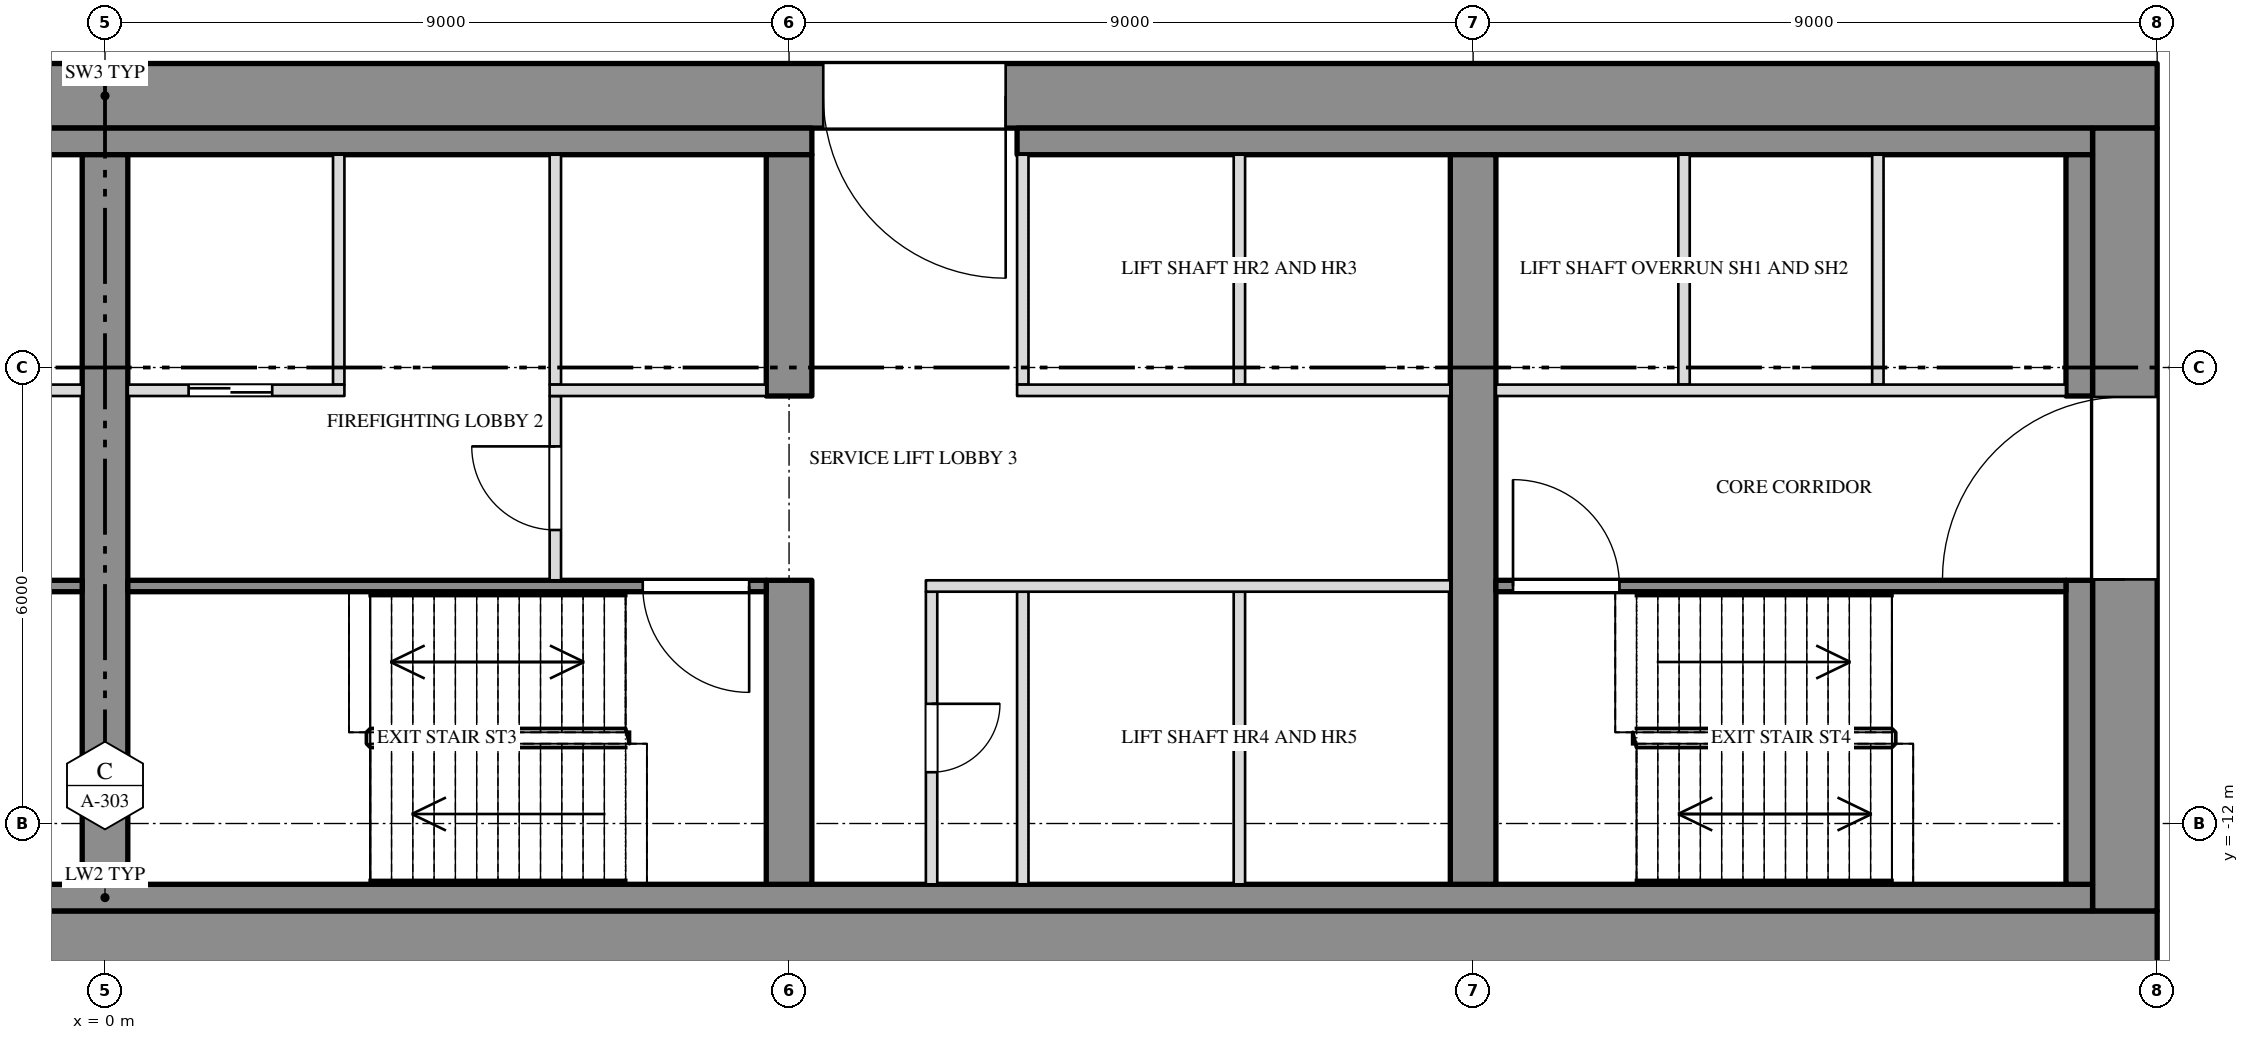
"""IFC4 building model, lengths in metres.
Left out: names, types, materials, properties, quantities, classifications, styles, units other than length and angle.
Written with IfcOpenShell. Run it as: python <this file> out.ifc"""

import sys

from ifc_helpers import new_model, si_unit, direction, frame, frame_2d, origin, place, context, subcontext, project, spatial, rectangle, extrude, element, fill, save


model = new_model("IFC4")
c1 = context("Model", 3, precision=1e-05, world=origin(), true_north=direction((0.0, 1.0)))
c2 = subcontext(c1, "Body", "Model", "MODEL_VIEW")
j1 = project(units=[si_unit("LENGTHUNIT", "METRE"), si_unit("PLANEANGLEUNIT", "RADIAN")], contexts=[c1])
p1 = place(None, origin())
s1 = spatial("IfcSite", under=j1, at=p1, CompositionType="ELEMENT")
p2 = place(p1, origin())
s2 = spatial("IfcBuilding", under=s1, at=p2, CompositionType="ELEMENT")
p3 = place(p2, frame((0.0, 0.0, 160.5)))
s3 = spatial("IfcBuildingStorey", under=s2, at=p3, CompositionType="ELEMENT", Elevation=160.5)
p4 = place(p3, frame((-27.0, -2.425, 0.0), z_axis=(0.0, 0.0, 1.0), x_axis=(1.0, 0.0, 0.0)))
e1 = element("IfcWall", 1, at=p4, inside=s3, PredefinedType="SHEAR", context=c2, shape_type="SweptSolid", body=[
    extrude(rectangle(XDim=54.0, YDim=0.85, at=frame_2d((27.0, 0.0))), origin(), (0.0, 0.0, 1.0), 3.8),
])
p5 = place(p4, frame((15.15, 0.0, 0.0)))
e2 = element("IfcOpeningElement", 2, at=p5, cuts=e1, PredefinedType="OPENING", context=c2, shape_type="SweptSolid", body=[
    extrude(rectangle(XDim=2.4, YDim=2.1, at=frame_2d((1.2, 1.05))), frame((0.0, 0.437, 0.0), z_axis=(0.0, -1.0, 0.0), x_axis=(1.0, 0.0, 0.0)), (0.0, 0.0, 1.0), 0.874),
])
p6 = place(p4, frame((36.45, 0.0, 0.0)))
e3 = element("IfcOpeningElement", 3, at=p6, cuts=e1, PredefinedType="OPENING", context=c2, shape_type="SweptSolid", body=[
    extrude(rectangle(XDim=2.4, YDim=2.1, at=frame_2d((1.2, 1.05))), frame((0.0, 0.437, 0.0), z_axis=(0.0, -1.0, 0.0), x_axis=(1.0, 0.0, 0.0)), (0.0, 0.0, 1.0), 0.874),
])
p7 = place(p3, frame((-27.0, -13.575, 0.0), z_axis=(0.0, 0.0, 1.0), x_axis=(1.0, 0.0, 0.0)))
e4 = element("IfcWall", 4, at=p7, inside=s3, PredefinedType="SHEAR", context=c2, shape_type="SweptSolid", body=[
    extrude(rectangle(XDim=54.0, YDim=0.85, at=frame_2d((27.0, 0.0))), origin(), (0.0, 0.0, 1.0), 3.8),
])
p8 = place(p3, frame((26.575, -13.15, 0.0), z_axis=(0.0, 0.0, 1.0), x_axis=(0.0, 1.0, 0.0)))
e5 = element("IfcWall", 5, at=p8, inside=s3, PredefinedType="SHEAR", context=c2, shape_type="SweptSolid", body=[
    extrude(rectangle(XDim=10.3, YDim=0.85, at=frame_2d((5.15, 0.0))), origin(), (0.0, 0.0, 1.0), 3.8),
])
p9 = place(p8, frame((4.362, 0.0, 0.0)))
e6 = element("IfcOpeningElement", 6, at=p9, cuts=e5, PredefinedType="OPENING", context=c2, shape_type="SweptSolid", body=[
    extrude(rectangle(XDim=2.4, YDim=2.1, at=frame_2d((1.2, 1.05))), frame((0.0, 0.437, 0.0), z_axis=(0.0, -1.0, 0.0), x_axis=(1.0, 0.0, 0.0)), (0.0, 0.0, 1.0), 0.874),
])
p10 = place(p3, frame((-9.3, -3.025, 0.0), z_axis=(0.0, 0.0, 1.0), x_axis=(1.0, 0.0, 0.0)))
e7 = element("IfcWall", 7, at=p10, inside=s3, PredefinedType="SHEAR", context=c2, shape_type="SweptSolid", body=[
    extrude(rectangle(XDim=18.6, YDim=0.35, at=frame_2d((9.3, 0.0))), origin(), (0.0, 0.0, 1.0), 3.8),
])
p11 = place(p3, frame((12.0, -3.025, 0.0), z_axis=(0.0, 0.0, 1.0), x_axis=(1.0, 0.0, 0.0)))
e8 = element("IfcWall", 8, at=p11, inside=s3, PredefinedType="SHEAR", context=c2, shape_type="SweptSolid", body=[
    extrude(rectangle(XDim=14.15, YDim=0.35, at=frame_2d((7.075, 0.0))), origin(), (0.0, 0.0, 1.0), 3.8),
])
p12 = place(p3, frame((-26.15, -12.975, 0.0), z_axis=(0.0, 0.0, 1.0), x_axis=(1.0, 0.0, 0.0)))
e9 = element("IfcWall", 9, at=p12, inside=s3, PredefinedType="SHEAR", context=c2, shape_type="SweptSolid", body=[
    extrude(rectangle(XDim=52.3, YDim=0.35, at=frame_2d((26.15, 0.0))), origin(), (0.0, 0.0, 1.0), 3.8),
])
p13 = place(p3, frame((25.975, -12.8, 0.0), z_axis=(0.0, 0.0, 1.0), x_axis=(0.0, 1.0, 0.0)))
e10 = element("IfcWall", 10, at=p13, inside=s3, PredefinedType="SHEAR", context=c2, shape_type="SweptSolid", body=[
    extrude(rectangle(XDim=4.0, YDim=0.35, at=frame_2d((2.0, 0.0))), origin(), (0.0, 0.0, 1.0), 3.8),
])
p14 = place(p3, frame((25.975, -6.375, 0.0), z_axis=(0.0, 0.0, 1.0), x_axis=(0.0, 1.0, 0.0)))
e11 = element("IfcWall", 11, at=p14, inside=s3, PredefinedType="SHEAR", context=c2, shape_type="SweptSolid", body=[
    extrude(rectangle(XDim=3.175, YDim=0.35, at=frame_2d((1.587, 0.0))), origin(), (0.0, 0.0, 1.0), 3.8),
])
p15 = place(p3, frame((0.0, -12.8, 0.0), z_axis=(0.0, 0.0, 1.0), x_axis=(0.0, 1.0, 0.0)))
e12 = element("IfcWall", 12, at=p15, inside=s3, PredefinedType="SHEAR", context=c2, shape_type="SweptSolid", body=[
    extrude(rectangle(XDim=9.6, YDim=0.6, at=frame_2d((4.8, 0.0))), origin(), (0.0, 0.0, 1.0), 3.8),
])
p16 = place(p3, frame((9.0, -12.8, 0.0), z_axis=(0.0, 0.0, 1.0), x_axis=(0.0, 1.0, 0.0)))
e13 = element("IfcWall", 13, at=p16, inside=s3, PredefinedType="SHEAR", context=c2, shape_type="SweptSolid", body=[
    extrude(rectangle(XDim=4.0, YDim=0.6, at=frame_2d((2.0, 0.0))), origin(), (0.0, 0.0, 1.0), 3.8),
])
p17 = place(p3, frame((9.0, -6.375, 0.0), z_axis=(0.0, 0.0, 1.0), x_axis=(0.0, 1.0, 0.0)))
e14 = element("IfcWall", 14, at=p17, inside=s3, PredefinedType="SHEAR", context=c2, shape_type="SweptSolid", body=[
    extrude(rectangle(XDim=3.175, YDim=0.6, at=frame_2d((1.587, 0.0))), origin(), (0.0, 0.0, 1.0), 3.8),
])
p18 = place(p3, frame((18.0, -12.8, 0.0), z_axis=(0.0, 0.0, 1.0), x_axis=(0.0, 1.0, 0.0)))
e15 = element("IfcWall", 15, at=p18, inside=s3, PredefinedType="SHEAR", context=c2, shape_type="SweptSolid", body=[
    extrude(rectangle(XDim=9.6, YDim=0.6, at=frame_2d((4.8, 0.0))), origin(), (0.0, 0.0, 1.0), 3.8),
])
for number, where, z_axis, x_axis in (
    (16, (3.075, -6.225, 0.0), (0.0, 0.0, 1.0), (0.0, 1.0, 0.0)),
    (17, (5.925, -6.225, 0.0), (0.0, 0.0, 1.0), (0.0, 1.0, 0.0)),
    (18, (12.075, -6.225, 0.0), (0.0, 0.0, 1.0), (0.0, 1.0, 0.0)),
    (19, (14.925, -6.225, 0.0), (0.0, 0.0, 1.0), (0.0, 1.0, 0.0)),
    (20, (20.775, -6.225, 0.0), (0.0, 0.0, 1.0), (0.0, 1.0, 0.0)),
    (21, (23.325, -6.225, 0.0), (0.0, 0.0, 1.0), (0.0, 1.0, 0.0)),
):
    element("IfcWall", number, at=place(p3, frame(where, z_axis=z_axis, x_axis=x_axis)), inside=s3, PredefinedType="PARTITIONING", context=c2, shape_type="SweptSolid", body=[
        extrude(rectangle(XDim=3.025, YDim=0.15, at=frame_2d((1.513, 0.0))), origin(), (0.0, 0.0, 1.0), 3.8),
    ])
p19 = place(p3, frame((10.875, -12.8, 0.0), z_axis=(0.0, 0.0, 1.0), x_axis=(0.0, 1.0, 0.0)))
e22 = element("IfcWall", 22, at=p19, inside=s3, PredefinedType="PARTITIONING", context=c2, shape_type="SweptSolid", body=[
    extrude(rectangle(XDim=3.85, YDim=0.15, at=frame_2d((1.925, 0.0))), origin(), (0.0, 0.0, 1.0), 3.8),
])
p20 = place(p19, frame((1.475, 0.0, 0.0)))
e23 = element("IfcOpeningElement", 23, at=p20, cuts=e22, PredefinedType="OPENING", context=c2, shape_type="SweptSolid", body=[
    extrude(rectangle(XDim=0.9, YDim=2.1, at=frame_2d((0.45, 1.05))), frame((0.0, 0.087, 0.0), z_axis=(0.0, -1.0, 0.0), x_axis=(1.0, 0.0, 0.0)), (0.0, 0.0, 1.0), 0.174),
])
for number, where, z_axis, x_axis in (
    (24, (12.075, -12.8, 0.0), (0.0, 0.0, 1.0), (0.0, 1.0, 0.0)),
    (25, (14.925, -12.8, 0.0), (0.0, 0.0, 1.0), (0.0, 1.0, 0.0)),
):
    element("IfcWall", number, at=place(p3, frame(where, z_axis=z_axis, x_axis=x_axis)), inside=s3, PredefinedType="PARTITIONING", context=c2, shape_type="SweptSolid", body=[
        extrude(rectangle(XDim=3.85, YDim=0.15, at=frame_2d((1.925, 0.0))), origin(), (0.0, 0.0, 1.0), 3.8),
    ])
p21 = place(p3, frame((5.925, -8.8, 0.0), z_axis=(0.0, 0.0, 1.0), x_axis=(0.0, 1.0, 0.0)))
e26 = element("IfcWall", 26, at=p21, inside=s3, PredefinedType="PARTITIONING", context=c2, shape_type="SweptSolid", body=[
    extrude(rectangle(XDim=2.425, YDim=0.15, at=frame_2d((1.212, 0.0))), origin(), (0.0, 0.0, 1.0), 3.8),
])
p22 = place(p21, frame((0.662, 0.0, 0.0)))
e27 = element("IfcOpeningElement", 27, at=p22, cuts=e26, PredefinedType="OPENING", context=c2, shape_type="SweptSolid", body=[
    extrude(rectangle(XDim=1.1, YDim=2.1, at=frame_2d((0.55, 1.05))), frame((0.0, 0.087, 0.0), z_axis=(0.0, -1.0, 0.0), x_axis=(1.0, 0.0, 0.0)), (0.0, 0.0, 1.0), 0.174),
])
p23 = place(p3, frame((-3.15, -6.3, 0.0), z_axis=(0.0, 0.0, 1.0), x_axis=(1.0, 0.0, 0.0)))
e28 = element("IfcWall", 28, at=p23, inside=s3, PredefinedType="PARTITIONING", context=c2, shape_type="SweptSolid", body=[
    extrude(rectangle(XDim=2.85, YDim=0.15, at=frame_2d((1.425, 0.0))), origin(), (0.0, 0.0, 1.0), 3.8),
])
p24 = place(p23, frame((0.95, 0.0, 0.0)))
e29 = element("IfcOpeningElement", 29, at=p24, cuts=e28, PredefinedType="OPENING", context=c2, shape_type="SweptSolid", body=[
    extrude(rectangle(XDim=1.1, YDim=2.1, at=frame_2d((0.55, 1.05))), frame((0.0, 0.087, 0.0), z_axis=(0.0, -1.0, 0.0), x_axis=(1.0, 0.0, 0.0)), (0.0, 0.0, 1.0), 0.174),
])
p25 = place(p3, frame((0.3, -6.3, 0.0), z_axis=(0.0, 0.0, 1.0), x_axis=(1.0, 0.0, 0.0)))
e30 = element("IfcWall", 30, at=p25, inside=s3, PredefinedType="PARTITIONING", context=c2, shape_type="SweptSolid", body=[
    extrude(rectangle(XDim=2.85, YDim=0.15, at=frame_2d((1.425, 0.0))), origin(), (0.0, 0.0, 1.0), 3.8),
])
p26 = place(p25, frame((0.8, 0.0, 0.0)))
e31 = element("IfcOpeningElement", 31, at=p26, cuts=e30, PredefinedType="OPENING", context=c2, shape_type="SweptSolid", body=[
    extrude(rectangle(XDim=1.1, YDim=2.1, at=frame_2d((0.55, 1.05))), frame((0.0, 0.087, 0.0), z_axis=(0.0, -1.0, 0.0), x_axis=(1.0, 0.0, 0.0)), (0.0, 0.0, 1.0), 0.174),
])
p27 = place(p3, frame((5.85, -6.3, 0.0), z_axis=(0.0, 0.0, 1.0), x_axis=(1.0, 0.0, 0.0)))
e32 = element("IfcWall", 32, at=p27, inside=s3, PredefinedType="PARTITIONING", context=c2, shape_type="SweptSolid", body=[
    extrude(rectangle(XDim=2.85, YDim=0.15, at=frame_2d((1.425, 0.0))), origin(), (0.0, 0.0, 1.0), 3.8),
])
p28 = place(p3, frame((12.0, -6.3, 0.0), z_axis=(0.0, 0.0, 1.0), x_axis=(1.0, 0.0, 0.0)))
e33 = element("IfcWall", 33, at=p28, inside=s3, PredefinedType="PARTITIONING", context=c2, shape_type="SweptSolid", body=[
    extrude(rectangle(XDim=5.7, YDim=0.15, at=frame_2d((2.85, 0.0))), origin(), (0.0, 0.0, 1.0), 3.8),
])
p29 = place(p3, frame((18.3, -6.3, 0.0), z_axis=(0.0, 0.0, 1.0), x_axis=(1.0, 0.0, 0.0)))
e34 = element("IfcWall", 34, at=p29, inside=s3, PredefinedType="PARTITIONING", context=c2, shape_type="SweptSolid", body=[
    extrude(rectangle(XDim=7.5, YDim=0.15, at=frame_2d((3.75, 0.0))), origin(), (0.0, 0.0, 1.0), 3.8),
])
p30 = place(p3, frame((-8.7, -8.875, 0.0), z_axis=(0.0, 0.0, 1.0), x_axis=(1.0, 0.0, 0.0)))
e35 = element("IfcWall", 35, at=p30, inside=s3, PredefinedType="SHEAR", context=c2, shape_type="SweptSolid", body=[
    extrude(rectangle(XDim=8.4, YDim=0.15, at=frame_2d((4.2, 0.0))), origin(), (0.0, 0.0, 1.0), 3.8),
])
p31 = place(p30, frame((0.225, 0.0, 0.0)))
e36 = element("IfcOpeningElement", 36, at=p31, cuts=e35, PredefinedType="OPENING", context=c2, shape_type="SweptSolid", body=[
    extrude(rectangle(XDim=1.4, YDim=2.1, at=frame_2d((0.7, 1.05))), frame((0.0, 0.087, 0.0), z_axis=(0.0, -1.0, 0.0), x_axis=(1.0, 0.0, 0.0)), (0.0, 0.0, 1.0), 0.174),
])
p32 = place(p3, frame((0.3, -8.875, 0.0), z_axis=(0.0, 0.0, 1.0), x_axis=(1.0, 0.0, 0.0)))
e37 = element("IfcWall", 37, at=p32, inside=s3, PredefinedType="SHEAR", context=c2, shape_type="SweptSolid", body=[
    extrude(rectangle(XDim=8.4, YDim=0.15, at=frame_2d((4.2, 0.0))), origin(), (0.0, 0.0, 1.0), 3.8),
])
p33 = place(p32, frame((6.775, 0.0, 0.0)))
e38 = element("IfcOpeningElement", 38, at=p33, cuts=e37, PredefinedType="OPENING", context=c2, shape_type="SweptSolid", body=[
    extrude(rectangle(XDim=1.4, YDim=2.1, at=frame_2d((0.7, 1.05))), frame((0.0, 0.087, 0.0), z_axis=(0.0, -1.0, 0.0), x_axis=(1.0, 0.0, 0.0)), (0.0, 0.0, 1.0), 0.174),
])
p34 = place(p3, frame((10.8, -8.875, 0.0), z_axis=(0.0, 0.0, 1.0), x_axis=(1.0, 0.0, 0.0)))
e39 = element("IfcWall", 39, at=p34, inside=s3, PredefinedType="PARTITIONING", context=c2, shape_type="SweptSolid", body=[
    extrude(rectangle(XDim=6.9, YDim=0.15, at=frame_2d((3.45, 0.0))), origin(), (0.0, 0.0, 1.0), 3.8),
])
p35 = place(p3, frame((18.3, -8.875, 0.0), z_axis=(0.0, 0.0, 1.0), x_axis=(1.0, 0.0, 0.0)))
e40 = element("IfcWall", 40, at=p35, inside=s3, PredefinedType="SHEAR", context=c2, shape_type="SweptSolid", body=[
    extrude(rectangle(XDim=7.5, YDim=0.15, at=frame_2d((3.75, 0.0))), origin(), (0.0, 0.0, 1.0), 3.8),
])
p36 = place(p35, frame((0.225, 0.0, 0.0)))
e41 = element("IfcOpeningElement", 41, at=p36, cuts=e40, PredefinedType="OPENING", context=c2, shape_type="SweptSolid", body=[
    extrude(rectangle(XDim=1.4, YDim=2.1, at=frame_2d((0.7, 1.05))), frame((0.0, 0.087, 0.0), z_axis=(0.0, -1.0, 0.0), x_axis=(1.0, 0.0, 0.0)), (0.0, 0.0, 1.0), 0.174),
])
p37 = place(p26, origin())
e42 = element("IfcDoor", 42, at=p37, inside=s3, OperationType="SLIDING_TO_RIGHT", PredefinedType="DOOR", context=c2, shape_type="SweptSolid", body=[
    extrude(rectangle(XDim=1.1, YDim=2.1, at=frame_2d((0.55, 1.05))), frame((0.0, 0.025, 0.0), z_axis=(0.0, -1.0, 0.0), x_axis=(1.0, 0.0, 0.0)), (0.0, 0.0, 1.0), 0.05),
])
fill(e31, e42)
p38 = place(p22, origin())
e43 = element("IfcDoor", 43, at=p38, inside=s3, OperationType="SINGLE_SWING_RIGHT", PredefinedType="DOOR", context=c2, shape_type="SweptSolid", body=[
    extrude(rectangle(XDim=1.1, YDim=2.1, at=frame_2d((0.55, 1.05))), frame((0.0, 0.025, 0.0), z_axis=(0.0, -1.0, 0.0), x_axis=(1.0, 0.0, 0.0)), (0.0, 0.0, 1.0), 0.05),
])
fill(e27, e43)
p39 = place(p33, origin())
e44 = element("IfcDoor", 44, at=p39, inside=s3, OperationType="DOUBLE_DOOR_SINGLE_SWING", PredefinedType="DOOR", context=c2, shape_type="SweptSolid", body=[
    extrude(rectangle(XDim=1.4, YDim=2.1, at=frame_2d((0.7, 1.05))), frame((0.0, 0.025, 0.0), z_axis=(0.0, -1.0, 0.0), x_axis=(1.0, 0.0, 0.0)), (0.0, 0.0, 1.0), 0.05),
])
fill(e38, e44)
p40 = place(p6, origin())
e45 = element("IfcDoor", 45, at=p40, inside=s3, OperationType="DOUBLE_DOOR_SINGLE_SWING", PredefinedType="DOOR", context=c2, shape_type="SweptSolid", body=[
    extrude(rectangle(XDim=2.4, YDim=2.1, at=frame_2d((1.2, 1.05))), frame((0.0, 0.025, 0.0), z_axis=(0.0, -1.0, 0.0), x_axis=(1.0, 0.0, 0.0)), (0.0, 0.0, 1.0), 0.05),
])
fill(e3, e45)
p41 = place(p20, origin())
e46 = element("IfcDoor", 46, at=p41, inside=s3, OperationType="SINGLE_SWING_LEFT", PredefinedType="DOOR", context=c2, shape_type="SweptSolid", body=[
    extrude(rectangle(XDim=0.9, YDim=2.1, at=frame_2d((0.45, 1.05))), frame((0.0, 0.025, 0.0), z_axis=(0.0, -1.0, 0.0), x_axis=(1.0, 0.0, 0.0)), (0.0, 0.0, 1.0), 0.05),
])
fill(e23, e46)
p42 = place(p36, origin())
e47 = element("IfcDoor", 47, at=p42, inside=s3, OperationType="DOUBLE_DOOR_SINGLE_SWING", PredefinedType="DOOR", context=c2, shape_type="SweptSolid", body=[
    extrude(rectangle(XDim=1.4, YDim=2.1, at=frame_2d((0.7, 1.05))), frame((0.0, 0.025, 0.0), z_axis=(0.0, -1.0, 0.0), x_axis=(1.0, 0.0, 0.0)), (0.0, 0.0, 1.0), 0.05),
])
fill(e41, e47)
p43 = place(p9, origin())
e48 = element("IfcDoor", 48, at=p43, inside=s3, OperationType="DOUBLE_DOOR_SINGLE_SWING", PredefinedType="DOOR", context=c2, shape_type="SweptSolid", body=[
    extrude(rectangle(XDim=2.4, YDim=2.1, at=frame_2d((1.2, 1.05))), frame((0.0, 0.025, 0.0), z_axis=(0.0, -1.0, 0.0), x_axis=(1.0, 0.0, 0.0)), (0.0, 0.0, 1.0), 0.05),
])
fill(e6, e48)
save(model, sys.argv[1])
